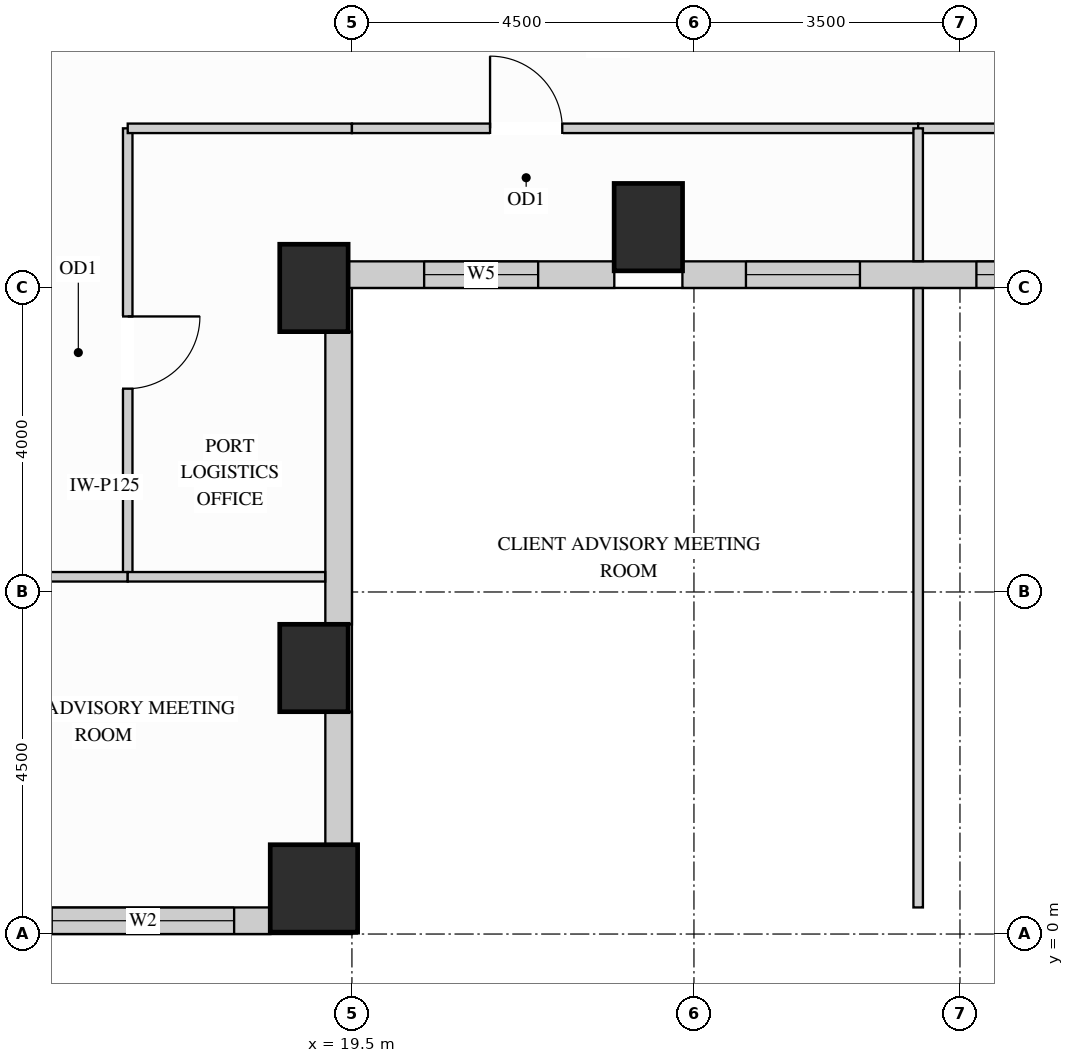
"""IFC4 building model, lengths in metres.
Left out: names, types, materials, properties, quantities, classifications, styles, units other than length and angle.
Written with IfcOpenShell. Run it as: python <this file> out.ifc"""

import sys

from ifc_helpers import new_model, si_unit, direction, frame, frame_2d, origin, origin_2d, place, context, subcontext, project, spatial, rectangle, extrude, source, transform, mapped, element, fill, save


model = new_model("IFC4")
c1 = context("Model", 3, precision=1e-05, world=origin(), true_north=direction((0.0, 1.0)))
c2 = subcontext(c1, "Body", "Model", "MODEL_VIEW")
j1 = project(units=[si_unit("LENGTHUNIT", "METRE"), si_unit("PLANEANGLEUNIT", "RADIAN")], contexts=[c1])
p1 = place(None, origin())
s1 = spatial("IfcSite", under=j1, at=p1, CompositionType="ELEMENT")
p2 = place(p1, origin())
s2 = spatial("IfcBuilding", under=s1, at=p2, CompositionType="ELEMENT")
p3 = place(p2, frame((0.0, 0.0, 99.0)))
s3 = spatial("IfcBuildingStorey", under=s2, at=p3, CompositionType="ELEMENT", Elevation=99.0)
m1 = source(origin(), c2, "Body", "SweptSolid", [
    extrude(rectangle(XDim=0.9, YDim=1.15, at=origin_2d()), origin(), (0.0, 0.0, 1.0), 3.38),
])
for number, where, z_axis, x_axis in (
    (1, (19.0, 3.5, 0.0), (0.0, 0.0, 1.0), (1.0, 0.0, 0.0)),
    (2, (19.0, 8.5, 0.0), (0.0, 0.0, 1.0), (1.0, 0.0, 0.0)),
    (3, (23.4, 9.3, 0.0), (0.0, 0.0, 1.0), (1.0, 0.0, 0.0)),
):
    element("IfcColumn", number, at=place(p3, frame(where, z_axis=z_axis, x_axis=x_axis)), inside=s3, PredefinedType="COLUMN", context=c2, shape_type="MappedRepresentation", body=[
        mapped(m1, transform((0.0, 0.0, 0.0), x_axis=(1.0, 0.0, 0.0), y_axis=(0.0, 1.0, 0.0), z_axis=(0.0, 0.0, 1.0))),
    ])
m2 = source(origin(), c2, "Body", "SweptSolid", [
    extrude(rectangle(XDim=1.15, YDim=1.15, at=origin_2d()), origin(), (0.0, 0.0, 1.0), 3.38),
])
p4 = place(p3, frame((19.0, 0.6, 0.0), z_axis=(0.0, 0.0, 1.0), x_axis=(1.0, 0.0, 0.0)))
e4 = element("IfcColumn", 4, at=p4, inside=s3, PredefinedType="COLUMN", context=c2, shape_type="MappedRepresentation", body=[
    mapped(m2, transform((0.0, 0.0, 0.0), x_axis=(1.0, 0.0, 0.0), y_axis=(0.0, 1.0, 0.0), z_axis=(0.0, 0.0, 1.0))),
])
p5 = place(p3, frame((15.073, 0.175, 0.0), z_axis=(0.0, 0.0, 1.0), x_axis=(1.0, 0.0, 0.0)))
e5 = element("IfcWall", 5, at=p5, inside=s3, PredefinedType="SOLIDWALL", context=c2, shape_type="SweptSolid", body=[
    extrude(rectangle(XDim=3.354, YDim=0.35, at=frame_2d((1.677, 0.0))), origin(), (0.0, 0.0, 1.0), 3.365),
])
p6 = place(p5, frame((0.477, 0.0, 0.78)))
e6 = element("IfcOpeningElement", 6, at=p6, cuts=e5, PredefinedType="OPENING", context=c2, shape_type="SweptSolid", body=[
    extrude(rectangle(XDim=2.4, YDim=2.1, at=frame_2d((1.2, 1.05))), frame((0.0, 0.185, 0.0), z_axis=(0.0, -1.0, 0.0), x_axis=(1.0, 0.0, 0.0)), (0.0, 0.0, 1.0), 0.37),
])
m3 = source(origin(), c2, "Body", "SweptSolid", [
    extrude(rectangle(XDim=1.754, YDim=0.35, at=frame_2d((0.877, 0.0))), origin(), (0.0, 0.0, 1.0), 2.519),
])
p7 = place(p3, frame((19.325, 1.173, 0.0), z_axis=(0.0, 0.0, 1.0), x_axis=(0.0, 1.0, 0.0)))
e7 = element("IfcWall", 7, at=p7, inside=s3, PredefinedType="SOLIDWALL", context=c2, shape_type="MappedRepresentation", body=[
    mapped(m3, transform((0.0, 0.0, 0.0), x_axis=(1.0, 0.0, 0.0), y_axis=(0.0, 1.0, 0.0), z_axis=(0.0, 0.0, 1.0))),
])
m4 = source(origin(), c2, "Body", "SweptSolid", [
    extrude(rectangle(XDim=3.854, YDim=0.35, at=frame_2d((1.927, 0.0))), origin(), (0.0, 0.0, 1.0), 2.519),
])
p8 = place(p3, frame((19.325, 4.073, 0.0), z_axis=(0.0, 0.0, 1.0), x_axis=(0.0, 1.0, 0.0)))
e8 = element("IfcWall", 8, at=p8, inside=s3, PredefinedType="SOLIDWALL", context=c2, shape_type="MappedRepresentation", body=[
    mapped(m4, transform((0.0, 0.0, 0.0), x_axis=(1.0, 0.0, 0.0), y_axis=(0.0, 1.0, 0.0), z_axis=(0.0, 0.0, 1.0))),
])
p9 = place(p3, frame((19.448, 8.675, 0.0), z_axis=(0.0, 0.0, 1.0), x_axis=(1.0, 0.0, 0.0)))
e9 = element("IfcWall", 9, at=p9, inside=s3, PredefinedType="SOLIDWALL", context=c2, shape_type="SweptSolid", body=[
    extrude(rectangle(XDim=3.504, YDim=0.35, at=frame_2d((1.752, 0.0))), origin(), (0.0, 0.0, 1.0), 3.365),
])
p10 = place(p9, frame((1.002, 0.0, 0.78)))
e10 = element("IfcOpeningElement", 10, at=p10, cuts=e9, PredefinedType="OPENING", context=c2, shape_type="SweptSolid", body=[
    extrude(rectangle(XDim=1.5, YDim=2.0, at=frame_2d((0.75, 1.0))), frame((0.0, 0.185, 0.0), z_axis=(0.0, -1.0, 0.0), x_axis=(1.0, 0.0, 0.0)), (0.0, 0.0, 1.0), 0.37),
])
p11 = place(p3, frame((23.848, 8.675, 0.0), z_axis=(0.0, 0.0, 1.0), x_axis=(1.0, 0.0, 0.0)))
e11 = element("IfcWall", 11, at=p11, inside=s3, PredefinedType="SOLIDWALL", context=c2, shape_type="SweptSolid", body=[
    extrude(rectangle(XDim=6.204, YDim=0.35, at=frame_2d((3.102, 0.0))), origin(), (0.0, 0.0, 1.0), 3.365),
])
p12 = place(p11, frame((0.836, 0.0, 0.78)))
e12 = element("IfcOpeningElement", 12, at=p12, cuts=e11, PredefinedType="OPENING", context=c2, shape_type="SweptSolid", body=[
    extrude(rectangle(XDim=1.5, YDim=2.0, at=frame_2d((0.75, 1.0))), frame((0.0, 0.185, 0.0), z_axis=(0.0, -1.0, 0.0), x_axis=(1.0, 0.0, 0.0)), (0.0, 0.0, 1.0), 0.37),
])
p13 = place(p11, frame((3.868, 0.0, 0.78)))
e13 = element("IfcOpeningElement", 13, at=p13, cuts=e11, PredefinedType="OPENING", context=c2, shape_type="SweptSolid", body=[
    extrude(rectangle(XDim=1.5, YDim=2.0, at=frame_2d((0.75, 1.0))), frame((0.0, 0.185, 0.0), z_axis=(0.0, -1.0, 0.0), x_axis=(1.0, 0.0, 0.0)), (0.0, 0.0, 1.0), 0.37),
])
p14 = place(p3, frame((16.55, 4.7, 0.0), z_axis=(0.0, 0.0, 1.0), x_axis=(0.0, 1.0, 0.0)))
e14 = element("IfcWall", 14, at=p14, inside=s3, PredefinedType="PARTITIONING", context=c2, shape_type="SweptSolid", body=[
    extrude(rectangle(XDim=5.9, YDim=0.125, at=frame_2d((2.95, 0.0))), origin(), (0.0, 0.0, 1.0), 3.365),
])
p15 = place(p14, frame((2.475, 0.0, 0.0)))
e15 = element("IfcOpeningElement", 15, at=p15, cuts=e14, PredefinedType="OPENING", context=c2, shape_type="SweptSolid", body=[
    extrude(rectangle(XDim=0.95, YDim=2.15, at=frame_2d((0.475, 1.075))), frame((0.0, 0.073, 0.0), z_axis=(0.0, -1.0, 0.0), x_axis=(1.0, 0.0, 0.0)), (0.0, 0.0, 1.0), 0.145),
])
m5 = source(origin(), c2, "Body", "SweptSolid", [
    extrude(rectangle(XDim=2.95, YDim=0.125, at=frame_2d((1.475, 0.0))), origin(), (0.0, 0.0, 1.0), 3.365),
])
p16 = place(p3, frame((16.55, 10.6, 0.0), z_axis=(0.0, 0.0, 1.0), x_axis=(1.0, 0.0, 0.0)))
e16 = element("IfcWall", 16, at=p16, inside=s3, PredefinedType="PARTITIONING", context=c2, shape_type="MappedRepresentation", body=[
    mapped(m5, transform((0.0, 0.0, 0.0), x_axis=(1.0, 0.0, 0.0), y_axis=(0.0, 1.0, 0.0), z_axis=(0.0, 0.0, 1.0))),
])
p17 = place(p3, frame((19.5, 10.6, 0.0), z_axis=(0.0, 0.0, 1.0), x_axis=(1.0, 0.0, 0.0)))
e17 = element("IfcWall", 17, at=p17, inside=s3, PredefinedType="PARTITIONING", context=c2, shape_type="SweptSolid", body=[
    extrude(rectangle(XDim=7.45, YDim=0.125, at=frame_2d((3.725, 0.0))), origin(), (0.0, 0.0, 1.0), 3.365),
])
p18 = place(p17, frame((1.817, 0.0, 0.0)))
e18 = element("IfcOpeningElement", 18, at=p18, cuts=e17, PredefinedType="OPENING", context=c2, shape_type="SweptSolid", body=[
    extrude(rectangle(XDim=0.95, YDim=2.15, at=frame_2d((0.475, 1.075))), frame((0.0, 0.073, 0.0), z_axis=(0.0, -1.0, 0.0), x_axis=(1.0, 0.0, 0.0)), (0.0, 0.0, 1.0), 0.145),
])
p19 = place(p3, frame((26.95, 10.6, 0.0), z_axis=(0.0, 0.0, 1.0), x_axis=(1.0, 0.0, 0.0)))
e19 = element("IfcWall", 19, at=p19, inside=s3, PredefinedType="PARTITIONING", context=c2, shape_type="SweptSolid", body=[
    extrude(rectangle(XDim=7.45, YDim=0.125, at=frame_2d((3.725, 0.0))), origin(), (0.0, 0.0, 1.0), 3.365),
])
p20 = place(p19, frame((4.683, 0.0, 0.0)))
e20 = element("IfcOpeningElement", 20, at=p20, cuts=e19, PredefinedType="OPENING", context=c2, shape_type="SweptSolid", body=[
    extrude(rectangle(XDim=0.95, YDim=2.15, at=frame_2d((0.475, 1.075))), frame((0.0, 0.073, 0.0), z_axis=(0.0, -1.0, 0.0), x_axis=(1.0, 0.0, 0.0)), (0.0, 0.0, 1.0), 0.145),
])
m6 = source(origin(), c2, "Body", "SweptSolid", [
    extrude(rectangle(XDim=8.148, YDim=0.125, at=frame_2d((4.074, 0.0))), origin(), (0.0, 0.0, 1.0), 3.365),
])
p21 = place(p3, frame((26.95, 0.35, 0.0), z_axis=(0.0, 0.0, 1.0), x_axis=(0.0, 1.0, 0.0)))
e21 = element("IfcWall", 21, at=p21, inside=s3, PredefinedType="PARTITIONING", context=c2, shape_type="MappedRepresentation", body=[
    mapped(m6, transform((0.0, 0.0, 0.0), x_axis=(1.0, 0.0, 0.0), y_axis=(0.0, 1.0, 0.0), z_axis=(0.0, 0.0, 1.0))),
])
m7 = source(origin(), c2, "Body", "SweptSolid", [
    extrude(rectangle(XDim=1.748, YDim=0.125, at=frame_2d((0.874, 0.0))), origin(), (0.0, 0.0, 1.0), 3.365),
])
p22 = place(p3, frame((26.95, 8.852, 0.0), z_axis=(0.0, 0.0, 1.0), x_axis=(0.0, 1.0, 0.0)))
e22 = element("IfcWall", 22, at=p22, inside=s3, PredefinedType="PARTITIONING", context=c2, shape_type="MappedRepresentation", body=[
    mapped(m7, transform((0.0, 0.0, 0.0), x_axis=(1.0, 0.0, 0.0), y_axis=(0.0, 1.0, 0.0), z_axis=(0.0, 0.0, 1.0))),
])
p23 = place(p3, frame((11.537, 4.7, 0.0), z_axis=(0.0, 0.0, 1.0), x_axis=(1.0, 0.0, 0.0)))
e23 = element("IfcWall", 23, at=p23, inside=s3, PredefinedType="PARTITIONING", context=c2, shape_type="SweptSolid", body=[
    extrude(rectangle(XDim=5.013, YDim=0.125, at=frame_2d((2.506, 0.0))), origin(), (0.0, 0.0, 1.0), 2.828),
])
p24 = place(p23, frame((2.031, 0.0, 0.0)))
e24 = element("IfcOpeningElement", 24, at=p24, cuts=e23, PredefinedType="OPENING", context=c2, shape_type="SweptSolid", body=[
    extrude(rectangle(XDim=0.95, YDim=2.15, at=frame_2d((0.475, 1.075))), frame((0.0, 0.073, 0.0), z_axis=(0.0, -1.0, 0.0), x_axis=(1.0, 0.0, 0.0)), (0.0, 0.0, 1.0), 0.145),
])
m8 = source(origin(), c2, "Body", "SweptSolid", [
    extrude(rectangle(XDim=2.598, YDim=0.125, at=frame_2d((1.299, 0.0))), origin(), (0.0, 0.0, 1.0), 2.828),
])
p25 = place(p3, frame((16.55, 4.7, 0.0), z_axis=(0.0, 0.0, 1.0), x_axis=(1.0, 0.0, 0.0)))
e25 = element("IfcWall", 25, at=p25, inside=s3, PredefinedType="PARTITIONING", context=c2, shape_type="MappedRepresentation", body=[
    mapped(m8, transform((0.0, 0.0, 0.0), x_axis=(1.0, 0.0, 0.0), y_axis=(0.0, 1.0, 0.0), z_axis=(0.0, 0.0, 1.0))),
])
m9 = source(origin(), c2, "Body", "SweptSolid", [
    extrude(rectangle(XDim=0.95, YDim=2.15, at=frame_2d((0.475, 1.075))), frame((0.0, 0.025, 0.0), z_axis=(0.0, -1.0, 0.0), x_axis=(1.0, 0.0, 0.0)), (0.0, 0.0, 1.0), 0.05),
])
p26 = place(p15, origin())
e26 = element("IfcDoor", 26, at=p26, inside=s3, OperationType="SINGLE_SWING_RIGHT", PredefinedType="DOOR", context=c2, shape_type="MappedRepresentation", body=[
    mapped(m9, transform((0.0, 0.0, 0.0), x_axis=(1.0, 0.0, 0.0), y_axis=(0.0, 1.0, 0.0), z_axis=(0.0, 0.0, 1.0))),
])
fill(e15, e26)
p27 = place(p18, origin())
e27 = element("IfcDoor", 27, at=p27, inside=s3, OperationType="SINGLE_SWING_LEFT", PredefinedType="DOOR", context=c2, shape_type="MappedRepresentation", body=[
    mapped(m9, transform((0.0, 0.0, 0.0), x_axis=(1.0, 0.0, 0.0), y_axis=(0.0, 1.0, 0.0), z_axis=(0.0, 0.0, 1.0))),
])
fill(e18, e27)
m10 = source(origin(), c2, "Body", "SweptSolid", [
    extrude(rectangle(XDim=2.4, YDim=2.1, at=frame_2d((1.2, 1.05))), frame((0.0, 0.03, 0.0), z_axis=(0.0, -1.0, 0.0), x_axis=(1.0, 0.0, 0.0)), (0.0, 0.0, 1.0), 0.06),
])
p28 = place(p6, origin())
e28 = element("IfcWindow", 28, at=p28, inside=s3, PartitioningType="SINGLE_PANEL", PredefinedType="WINDOW", context=c2, shape_type="MappedRepresentation", body=[
    mapped(m10, transform((0.0, 0.0, 0.0), x_axis=(1.0, 0.0, 0.0), y_axis=(0.0, 1.0, 0.0), z_axis=(0.0, 0.0, 1.0))),
])
fill(e6, e28)
m11 = source(origin(), c2, "Body", "SweptSolid", [
    extrude(rectangle(XDim=1.5, YDim=2.0, at=frame_2d((0.75, 1.0))), frame((0.0, 0.03, 0.0), z_axis=(0.0, -1.0, 0.0), x_axis=(1.0, 0.0, 0.0)), (0.0, 0.0, 1.0), 0.06),
])
p29 = place(p10, origin())
e29 = element("IfcWindow", 29, at=p29, inside=s3, PartitioningType="SINGLE_PANEL", PredefinedType="WINDOW", context=c2, shape_type="MappedRepresentation", body=[
    mapped(m11, transform((0.0, 0.0, 0.0), x_axis=(1.0, 0.0, 0.0), y_axis=(0.0, 1.0, 0.0), z_axis=(0.0, 0.0, 1.0))),
])
fill(e10, e29)
p30 = place(p12, origin())
e30 = element("IfcWindow", 30, at=p30, inside=s3, PartitioningType="SINGLE_PANEL", PredefinedType="WINDOW", context=c2, shape_type="MappedRepresentation", body=[
    mapped(m11, transform((0.0, 0.0, 0.0), x_axis=(1.0, 0.0, 0.0), y_axis=(0.0, 1.0, 0.0), z_axis=(0.0, 0.0, 1.0))),
])
fill(e12, e30)
p31 = place(p13, origin())
e31 = element("IfcWindow", 31, at=p31, inside=s3, PartitioningType="SINGLE_PANEL", PredefinedType="WINDOW", context=c2, shape_type="MappedRepresentation", body=[
    mapped(m11, transform((0.0, 0.0, 0.0), x_axis=(1.0, 0.0, 0.0), y_axis=(0.0, 1.0, 0.0), z_axis=(0.0, 0.0, 1.0))),
])
fill(e13, e31)
save(model, sys.argv[1])
